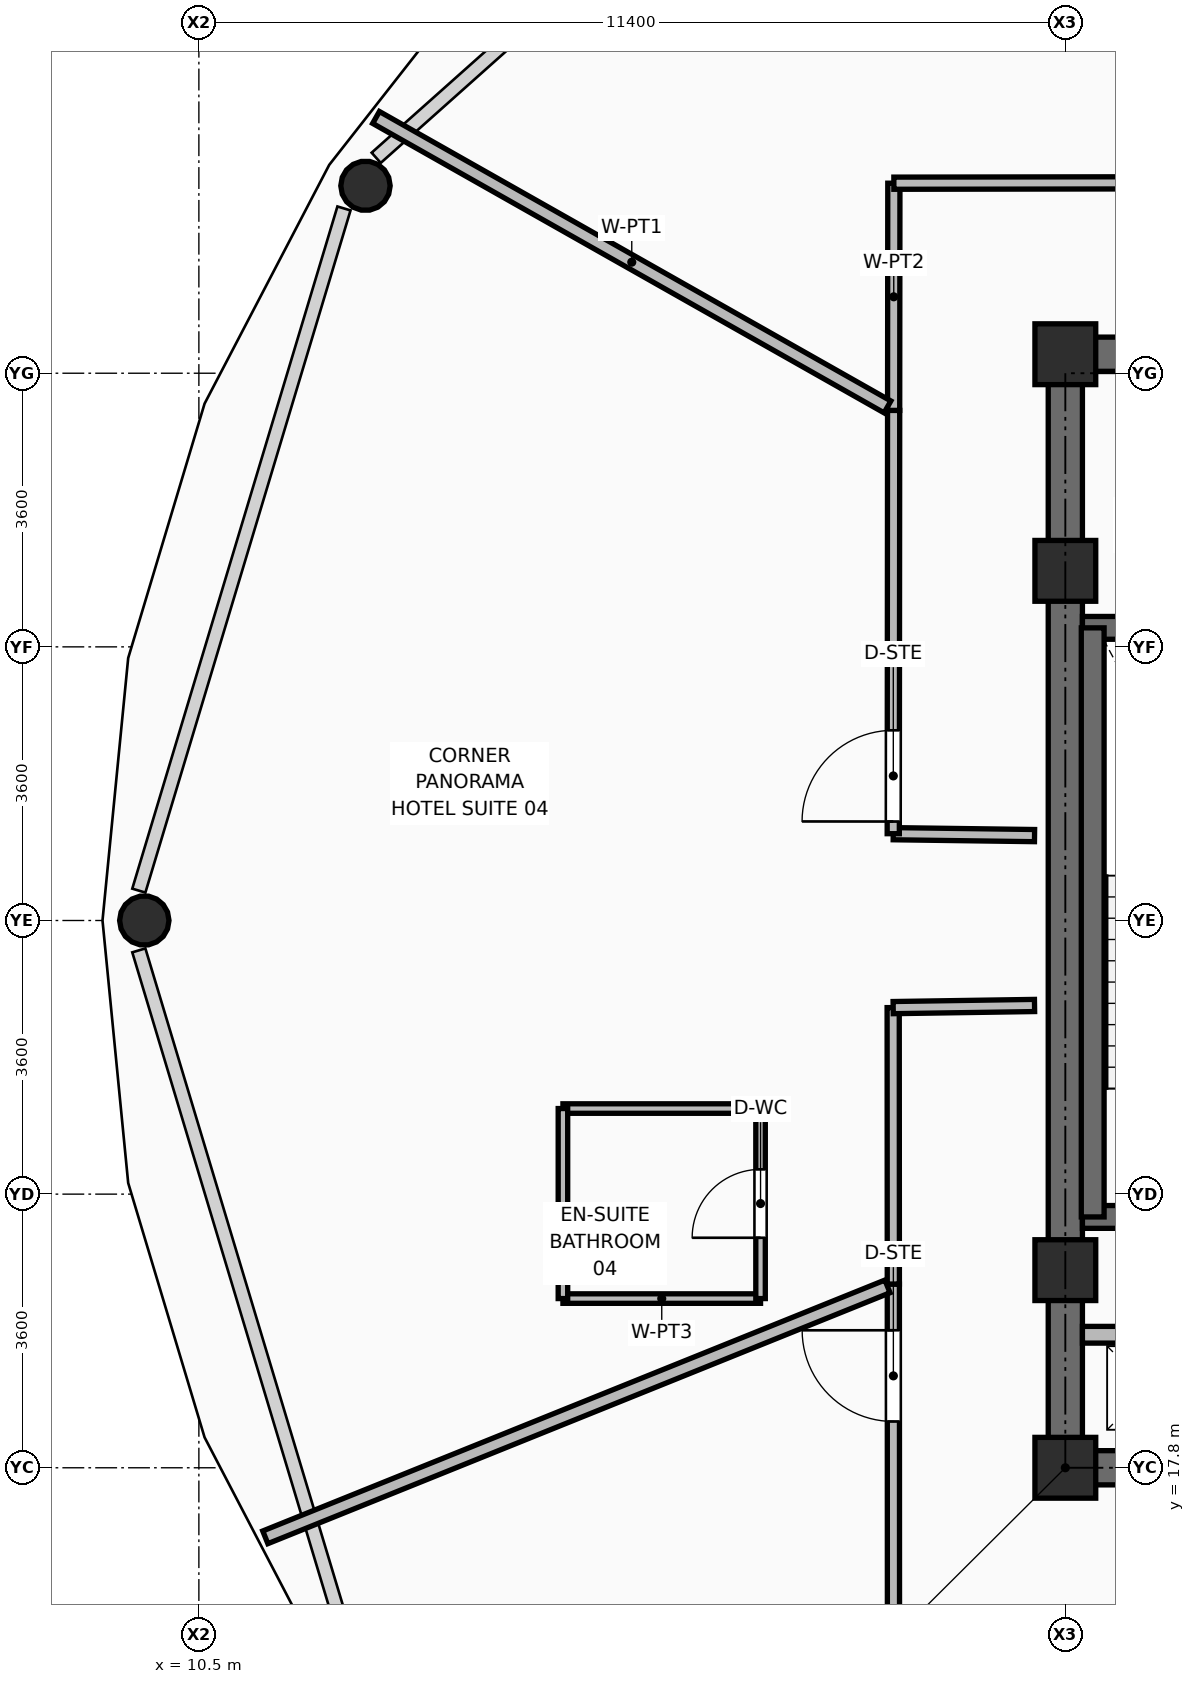
"""IFC4 building model, lengths in metres.
Left out: names, types, materials, properties, quantities, classifications, styles, units other than length and angle.
Written with IfcOpenShell. Run it as: python <this file> out.ifc"""

import sys

from ifc_helpers import new_model, si_unit, direction, frame, frame_2d, origin, origin_2d, place, context, subcontext, project, spatial, rectangle, hollow_circle, extrude, element, fill, save


model = new_model("IFC4")
c1 = context("Model", 3, precision=1e-05, world=origin(), true_north=direction((0.0, 1.0)))
c2 = subcontext(c1, "Body", "Model", "MODEL_VIEW")
j1 = project(units=[si_unit("LENGTHUNIT", "METRE"), si_unit("PLANEANGLEUNIT", "RADIAN")], contexts=[c1])
p1 = place(None, origin())
s1 = spatial("IfcSite", under=j1, at=p1, CompositionType="ELEMENT")
p2 = place(p1, origin())
s2 = spatial("IfcBuilding", under=s1, at=p2, CompositionType="ELEMENT")
p3 = place(p2, frame((0.0, 0.0, 246.15)))
s3 = spatial("IfcBuildingStorey", under=s2, at=p3, CompositionType="ELEMENT", Elevation=246.15)
for number, where, z_axis, x_axis in (
    (1, (21.9, 17.8, 0.0), (0.0, 0.0, 1.0), (1.0, 0.0, 0.0)),
    (2, (21.9, 20.4, 0.0), (0.0, 0.0, 1.0), (1.0, 0.0, 0.0)),
    (3, (21.9, 29.6, 0.0), (0.0, 0.0, 1.0), (1.0, 0.0, 0.0)),
    (4, (21.9, 32.45, 0.0), (0.0, 0.0, 1.0), (1.0, 0.0, 0.0)),
):
    element("IfcColumn", number, at=place(p3, frame(where, z_axis=z_axis, x_axis=x_axis)), inside=s3, PredefinedType="COLUMN", context=c2, shape_type="SweptSolid", body=[
        extrude(rectangle(XDim=0.8, YDim=0.8, at=origin_2d()), origin(), (0.0, 0.0, 1.0), 3.75),
    ])
for number, where, z_axis, x_axis in (
    (5, (12.692, 34.666, 0.0), (0.0, 0.0, 1.0), (1.0, 0.0, 0.0)),
    (6, (9.782, 25.0, 0.0), (0.0, 0.0, 1.0), (1.0, 0.0, 0.0)),
):
    element("IfcColumn", number, at=place(p3, frame(where, z_axis=z_axis, x_axis=x_axis)), inside=s3, PredefinedType="COLUMN", context=c2, shape_type="SweptSolid", body=[
        extrude(hollow_circle(Radius=0.325, WallThickness=0.03, at=origin_2d()), origin(), (0.0, 0.0, 1.0), 3.57),
    ])
p4 = place(p3, frame((21.675, 17.8, 0.0), z_axis=(0.0, 0.0, 1.0), x_axis=(1.0, 0.0, 0.0)))
e7 = element("IfcWall", 7, at=p4, inside=s3, PredefinedType="SHEAR", context=c2, shape_type="SweptSolid", body=[
    extrude(rectangle(XDim=2.075, YDim=0.45, at=frame_2d((1.038, 0.0))), origin(), (0.0, 0.0, 1.0), 3.57),
])
p5 = place(p3, frame((21.675, 32.45, 0.0), z_axis=(0.0, 0.0, 1.0), x_axis=(1.0, 0.0, 0.0)))
e8 = element("IfcWall", 8, at=p5, inside=s3, PredefinedType="SHEAR", context=c2, shape_type="SweptSolid", body=[
    extrude(rectangle(XDim=19.65, YDim=0.45, at=frame_2d((9.825, 0.0))), origin(), (0.0, 0.0, 1.0), 3.57),
])
p6 = place(p5, frame((2.075, 0.0, 0.0)))
e9 = element("IfcOpeningElement", 9, at=p6, cuts=e8, PredefinedType="OPENING", context=c2, shape_type="SweptSolid", body=[
    extrude(rectangle(XDim=1.1, YDim=2.1, at=frame_2d((0.55, 1.05))), frame((0.0, 0.235, 0.0), z_axis=(0.0, -1.0, 0.0), x_axis=(1.0, 0.0, 0.0)), (0.0, 0.0, 1.0), 0.47),
])
p7 = place(p5, frame((15.465, 0.0, 0.0)))
e10 = element("IfcOpeningElement", 10, at=p7, cuts=e8, PredefinedType="OPENING", context=c2, shape_type="SweptSolid", body=[
    extrude(rectangle(XDim=1.0, YDim=2.1, at=frame_2d((0.5, 1.05))), frame((0.0, 0.235, 0.0), z_axis=(0.0, -1.0, 0.0), x_axis=(1.0, 0.0, 0.0)), (0.0, 0.0, 1.0), 0.47),
])
p8 = place(p5, frame((17.475, 0.0, 0.0)))
e11 = element("IfcOpeningElement", 11, at=p8, cuts=e8, PredefinedType="OPENING", context=c2, shape_type="SweptSolid", body=[
    extrude(rectangle(XDim=0.9, YDim=2.1, at=frame_2d((0.45, 1.05))), frame((0.0, 0.235, 0.0), z_axis=(0.0, -1.0, 0.0), x_axis=(1.0, 0.0, 0.0)), (0.0, 0.0, 1.0), 0.47),
])
p9 = place(p3, frame((21.9, 18.025, 0.0), z_axis=(0.0, 0.0, 1.0), x_axis=(0.0, 1.0, 0.0)))
e12 = element("IfcWall", 12, at=p9, inside=s3, PredefinedType="SHEAR", context=c2, shape_type="SweptSolid", body=[
    extrude(rectangle(XDim=14.2, YDim=0.45, at=frame_2d((7.1, 0.0))), origin(), (0.0, 0.0, 1.0), 3.57),
])
p10 = place(p3, frame((22.125, 21.1, 0.0), z_axis=(0.0, 0.0, 1.0), x_axis=(1.0, 0.0, 0.0)))
e13 = element("IfcWall", 13, at=p10, inside=s3, PredefinedType="SHEAR", context=c2, shape_type="SweptSolid", body=[
    extrude(rectangle(XDim=3.615, YDim=0.3, at=frame_2d((1.808, 0.0))), origin(), (0.0, 0.0, 1.0), 3.57),
])
p11 = place(p10, frame((2.095, 0.0, 0.0)))
e14 = element("IfcOpeningElement", 14, at=p11, cuts=e13, PredefinedType="OPENING", context=c2, shape_type="SweptSolid", body=[
    extrude(rectangle(XDim=1.05, YDim=2.1, at=frame_2d((0.525, 1.05))), frame((0.0, 0.16, 0.0), z_axis=(0.0, -1.0, 0.0), x_axis=(1.0, 0.0, 0.0)), (0.0, 0.0, 1.0), 0.32),
])
p12 = place(p3, frame((22.125, 28.85, 0.0), z_axis=(0.0, 0.0, 1.0), x_axis=(1.0, 0.0, 0.0)))
e15 = element("IfcWall", 15, at=p12, inside=s3, PredefinedType="SHEAR", context=c2, shape_type="SweptSolid", body=[
    extrude(rectangle(XDim=3.615, YDim=0.3, at=frame_2d((1.808, 0.0))), origin(), (0.0, 0.0, 1.0), 3.57),
])
p13 = place(p3, frame((22.26, 21.1, 0.0), z_axis=(0.0, 0.0, 1.0), x_axis=(0.0, 1.0, 0.0)))
e16 = element("IfcWall", 16, at=p13, inside=s3, PredefinedType="SHEAR", context=c2, shape_type="SweptSolid", body=[
    extrude(rectangle(XDim=7.75, YDim=0.3, at=frame_2d((3.875, 0.0))), origin(), (0.0, 0.0, 1.0), 3.57),
])
p14 = place(p3, frame((22.125, 19.55, 0.0), z_axis=(0.0, 0.0, 1.0), x_axis=(1.0, 0.0, 0.0)))
e17 = element("IfcWall", 17, at=p14, inside=s3, PredefinedType="PARTITIONING", context=c2, shape_type="SweptSolid", body=[
    extrude(rectangle(XDim=1.665, YDim=0.22, at=frame_2d((0.833, 0.0))), origin(), (0.0, 0.0, 1.0), 2.595),
])
p15 = place(p3, frame((21.495, 26.117, 0.0), z_axis=(0.0, 0.0, 1.0), x_axis=(-0.999908537082, 0.013524698532, 0.0)))
e18 = element("IfcWall", 18, at=p15, inside=s3, PredefinedType="PARTITIONING", context=c2, shape_type="SweptSolid", body=[
    extrude(rectangle(XDim=1.859, YDim=0.16, at=frame_2d((0.93, 0.0))), origin(), (0.0, 0.0, 1.0), 2.595),
])
p16 = place(p3, frame((19.636, 26.142, 0.0), z_axis=(0.0, 0.0, 1.0), x_axis=(0.000920648448, 0.999999576203, 0.0)))
e19 = element("IfcWall", 19, at=p16, inside=s3, PredefinedType="PARTITIONING", context=c2, shape_type="SweptSolid", body=[
    extrude(rectangle(XDim=5.569, YDim=0.16, at=frame_2d((2.784, 0.0))), origin(), (0.0, 0.0, 1.0), 3.55),
])
p17 = place(p16, frame((0.16, 0.0, 0.0)))
e20 = element("IfcOpeningElement", 20, at=p17, cuts=e19, PredefinedType="OPENING", context=c2, shape_type="SweptSolid", body=[
    extrude(rectangle(XDim=1.2, YDim=2.1, at=frame_2d((0.6, 1.05))), frame((0.0, 0.09, 0.0), z_axis=(0.0, -1.0, 0.0), x_axis=(1.0, 0.0, 0.0)), (0.0, 0.0, 1.0), 0.18),
])
p18 = place(p3, frame((19.641, 31.711, 0.0), z_axis=(0.0, 0.0, 1.0), x_axis=(0.000980151453, 0.999999519651, 0.0)))
e21 = element("IfcWall", 21, at=p18, inside=s3, PredefinedType="PARTITIONING", context=c2, shape_type="SweptSolid", body=[
    extrude(rectangle(XDim=2.989, YDim=0.16, at=frame_2d((1.495, 0.0))), origin(), (0.0, 0.0, 1.0), 3.081),
])
p19 = place(p3, frame((19.644, 34.7, 0.0), z_axis=(0.0, 0.0, 1.0), x_axis=(0.999998989417, 0.001421677005, 0.0)))
e22 = element("IfcWall", 22, at=p19, inside=s3, PredefinedType="PARTITIONING", context=c2, shape_type="SweptSolid", body=[
    extrude(rectangle(XDim=5.667, YDim=0.16, at=frame_2d((2.833, 0.0))), origin(), (0.0, 0.0, 1.0), 3.081),
])
p20 = place(p19, frame((3.863, 0.0, 0.0)))
e23 = element("IfcOpeningElement", 23, at=p20, cuts=e22, PredefinedType="OPENING", context=c2, shape_type="SweptSolid", body=[
    extrude(rectangle(XDim=1.2, YDim=2.1, at=frame_2d((0.6, 1.05))), frame((0.0, 0.09, 0.0), z_axis=(0.0, -1.0, 0.0), x_axis=(1.0, 0.0, 0.0)), (0.0, 0.0, 1.0), 0.18),
])
p21 = place(p3, frame((19.64, 12.271, 0.0), z_axis=(0.0, 0.0, 1.0), x_axis=(-0.000368697551, 0.999999932031, 0.0)))
e24 = element("IfcWall", 24, at=p21, inside=s3, PredefinedType="PARTITIONING", context=c2, shape_type="SweptSolid", body=[
    extrude(rectangle(XDim=7.946, YDim=0.16, at=frame_2d((3.973, 0.0))), origin(), (0.0, 0.0, 1.0), 3.081),
])
p22 = place(p21, frame((6.138, 0.0, 0.0)))
e25 = element("IfcOpeningElement", 25, at=p22, cuts=e24, PredefinedType="OPENING", context=c2, shape_type="SweptSolid", body=[
    extrude(rectangle(XDim=1.2, YDim=2.1, at=frame_2d((0.6, 1.05))), frame((0.0, 0.09, 0.0), z_axis=(0.0, -1.0, 0.0), x_axis=(1.0, 0.0, 0.0)), (0.0, 0.0, 1.0), 0.18),
])
p23 = place(p3, frame((19.637, 20.217, 0.0), z_axis=(0.0, 0.0, 1.0), x_axis=(-0.000537020799, 0.999999855804, 0.0)))
e26 = element("IfcWall", 26, at=p23, inside=s3, PredefinedType="PARTITIONING", context=c2, shape_type="SweptSolid", body=[
    extrude(rectangle(XDim=3.637, YDim=0.16, at=frame_2d((1.818, 0.0))), origin(), (0.0, 0.0, 1.0), 3.081),
])
p24 = place(p3, frame((19.635, 23.854, 0.0), z_axis=(0.0, 0.0, 1.0), x_axis=(0.999886107392, 0.015092125259, 0.0)))
e27 = element("IfcWall", 27, at=p24, inside=s3, PredefinedType="PARTITIONING", context=c2, shape_type="SweptSolid", body=[
    extrude(rectangle(XDim=1.86, YDim=0.16, at=frame_2d((0.93, 0.0))), origin(), (0.0, 0.0, 1.0), 2.595),
])
p25 = place(p3, frame((25.259, 34.79, 0.0), z_axis=(0.0, 0.0, 1.0), x_axis=(-0.537619190812, 0.843187764185, 0.0)))
e28 = element("IfcWall", 28, at=p25, inside=s3, PredefinedType="PARTITIONING", context=c2, shape_type="SweptSolid", body=[
    extrude(rectangle(XDim=8.77, YDim=0.18, at=frame_2d((4.385, 0.0))), origin(), (0.0, 0.0, 1.0), 2.925),
])
p26 = place(p3, frame((19.56, 31.757, 0.0), z_axis=(0.0, 0.0, 1.0), x_axis=(-0.870312783113, 0.492499400559, 0.0)))
e29 = element("IfcWall", 29, at=p26, inside=s3, PredefinedType="PARTITIONING", context=c2, shape_type="SweptSolid", body=[
    extrude(rectangle(XDim=7.732, YDim=0.18, at=frame_2d((3.866, 0.0))), origin(), (0.0, 0.0, 1.0), 2.925),
])
p27 = place(p3, frame((19.56, 20.186, 0.0), z_axis=(0.0, 0.0, 1.0), x_axis=(-0.927433425778, -0.37398828959, 0.0)))
e30 = element("IfcWall", 30, at=p27, inside=s3, PredefinedType="PARTITIONING", context=c2, shape_type="SweptSolid", body=[
    extrude(rectangle(XDim=8.827, YDim=0.18, at=frame_2d((4.413, 0.0))), origin(), (0.0, 0.0, 1.0), 2.925),
])
p28 = place(p3, frame((15.29, 20.026, 0.0), z_axis=(0.0, 0.0, 1.0), x_axis=(1.0, 0.0, 0.0)))
e31 = element("IfcWall", 31, at=p28, inside=s3, PredefinedType="PARTITIONING", context=c2, shape_type="SweptSolid", body=[
    extrude(rectangle(XDim=2.6, YDim=0.125, at=frame_2d((1.3, 0.0))), origin(), (0.0, 0.0, 1.0), 3.55),
])
p29 = place(p3, frame((15.29, 22.526, 0.0), z_axis=(0.0, 0.0, 1.0), x_axis=(1.0, 0.0, 0.0)))
e32 = element("IfcWall", 32, at=p29, inside=s3, PredefinedType="PARTITIONING", context=c2, shape_type="SweptSolid", body=[
    extrude(rectangle(XDim=2.6, YDim=0.125, at=frame_2d((1.3, 0.0))), origin(), (0.0, 0.0, 1.0), 3.081),
])
p30 = place(p3, frame((15.29, 20.026, 0.0), z_axis=(0.0, 0.0, 1.0), x_axis=(0.0, 1.0, 0.0)))
e33 = element("IfcWall", 33, at=p30, inside=s3, PredefinedType="PARTITIONING", context=c2, shape_type="SweptSolid", body=[
    extrude(rectangle(XDim=2.5, YDim=0.125, at=frame_2d((1.25, 0.0))), origin(), (0.0, 0.0, 1.0), 3.55),
])
p31 = place(p3, frame((17.89, 20.026, 0.0), z_axis=(0.0, 0.0, 1.0), x_axis=(0.0, 1.0, 0.0)))
e34 = element("IfcWall", 34, at=p31, inside=s3, PredefinedType="PARTITIONING", context=c2, shape_type="SweptSolid", body=[
    extrude(rectangle(XDim=2.5, YDim=0.125, at=frame_2d((1.25, 0.0))), origin(), (0.0, 0.0, 1.0), 3.081),
])
p32 = place(p31, frame((0.8, 0.0, 0.0)))
e35 = element("IfcOpeningElement", 35, at=p32, cuts=e34, PredefinedType="OPENING", context=c2, shape_type="SweptSolid", body=[
    extrude(rectangle(XDim=0.9, YDim=2.1, at=frame_2d((0.45, 1.05))), frame((0.0, 0.073, 0.0), z_axis=(0.0, -1.0, 0.0), x_axis=(1.0, 0.0, 0.0)), (0.0, 0.0, 1.0), 0.145),
])
p33 = place(p32, origin())
e36 = element("IfcDoor", 36, at=p33, inside=s3, OperationType="SINGLE_SWING_LEFT", PredefinedType="DOOR", context=c2, shape_type="SweptSolid", body=[
    extrude(rectangle(XDim=0.9, YDim=2.1, at=frame_2d((0.45, 1.05))), frame((0.0, 0.025, 0.0), z_axis=(0.0, -1.0, 0.0), x_axis=(1.0, 0.0, 0.0)), (0.0, 0.0, 1.0), 0.05),
])
fill(e35, e36)
p34 = place(p17, origin())
e37 = element("IfcDoor", 37, at=p34, inside=s3, OperationType="SINGLE_SWING_LEFT", PredefinedType="DOOR", context=c2, shape_type="SweptSolid", body=[
    extrude(rectangle(XDim=1.2, YDim=2.1, at=frame_2d((0.6, 1.05))), frame((0.0, 0.025, 0.0), z_axis=(0.0, -1.0, 0.0), x_axis=(1.0, 0.0, 0.0)), (0.0, 0.0, 1.0), 0.05),
])
fill(e20, e37)
p35 = place(p22, origin())
e38 = element("IfcDoor", 38, at=p35, inside=s3, OperationType="SINGLE_SWING_RIGHT", PredefinedType="DOOR", context=c2, shape_type="SweptSolid", body=[
    extrude(rectangle(XDim=1.2, YDim=2.1, at=frame_2d((0.6, 1.05))), frame((0.0, 0.025, 0.0), z_axis=(0.0, -1.0, 0.0), x_axis=(1.0, 0.0, 0.0)), (0.0, 0.0, 1.0), 0.05),
])
fill(e25, e38)
save(model, sys.argv[1])
